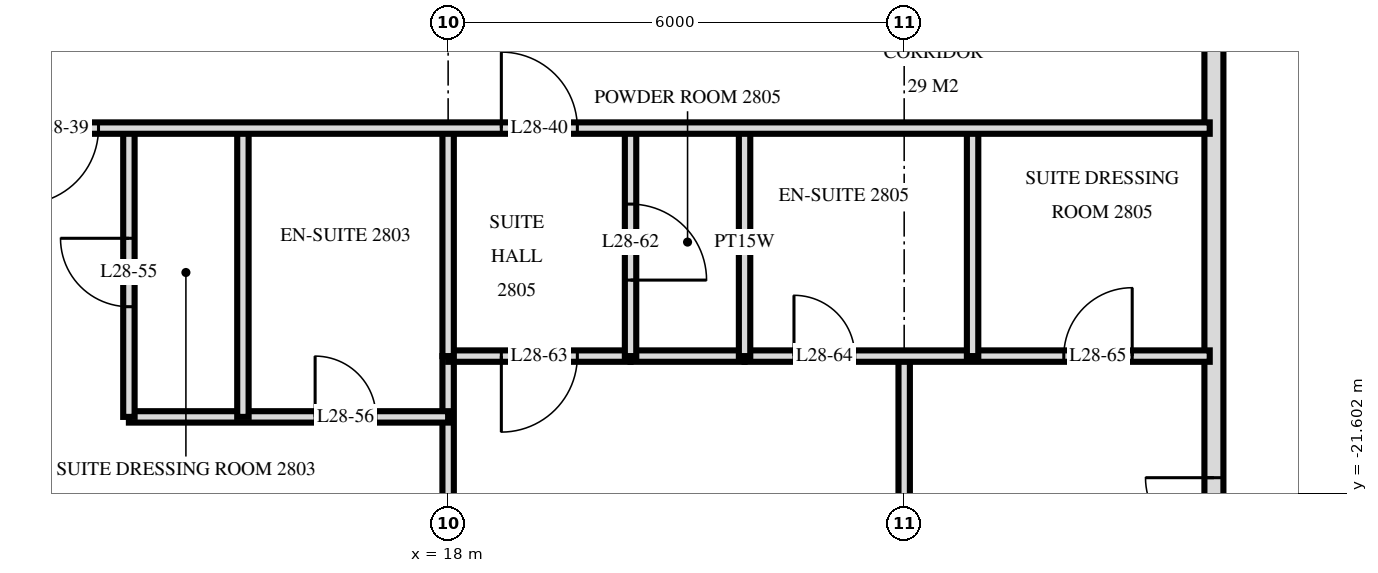
"""IFC4 building model, lengths in metres.
Left out: names, types, materials, properties, quantities, classifications, styles, units other than length and angle.
Written with IfcOpenShell. Run it as: python <this file> out.ifc"""

import sys

from ifc_helpers import new_model, si_unit, direction, frame, frame_2d, origin, place, context, subcontext, project, spatial, rectangle, extrude, element, fill, save


model = new_model("IFC4")
c1 = context("Model", 3, precision=1e-05, world=origin(), true_north=direction((0.0, 1.0)))
c2 = subcontext(c1, "Body", "Model", "MODEL_VIEW")
j1 = project(units=[si_unit("LENGTHUNIT", "METRE"), si_unit("PLANEANGLEUNIT", "RADIAN")], contexts=[c1])
p1 = place(None, origin())
s1 = spatial("IfcSite", under=j1, at=p1, CompositionType="ELEMENT")
p2 = place(p1, origin())
s2 = spatial("IfcBuilding", under=s1, at=p2, CompositionType="ELEMENT")
p3 = place(p2, frame((0.0, 0.0, 112.8)))
s3 = spatial("IfcBuildingStorey", under=s2, at=p3, CompositionType="ELEMENT", Elevation=112.8)
p4 = place(p3, frame((28.075, -29.275, 0.0), z_axis=(0.0, 0.0, 1.0), x_axis=(0.0, 1.0, 0.0)))
e1 = element("IfcWall", 1, at=p4, inside=s3, PredefinedType="SOLIDWALL", context=c2, shape_type="SweptSolid", body=[
    extrude(rectangle(XDim=25.951, YDim=0.25, at=frame_2d((12.975, 0.0))), origin(), (0.0, 0.0, 1.0), 3.32),
])
p5 = place(p4, frame((0.575, 0.0, 0.0)))
e2 = element("IfcOpeningElement", 2, at=p5, cuts=e1, PredefinedType="OPENING", context=c2, shape_type="SweptSolid", body=[
    extrude(rectangle(XDim=1.8, YDim=2.4, at=frame_2d((0.9, 1.2))), frame((0.0, 0.135, 0.0), z_axis=(0.0, -1.0, 0.0), x_axis=(1.0, 0.0, 0.0)), (0.0, 0.0, 1.0), 0.27),
])
p6 = place(p4, frame((3.325, 0.0, 0.3)))
e3 = element("IfcOpeningElement", 3, at=p6, cuts=e1, PredefinedType="OPENING", context=c2, shape_type="SweptSolid", body=[
    extrude(rectangle(XDim=1.8, YDim=2.1, at=frame_2d((0.9, 1.05))), frame((0.0, 0.135, 0.0), z_axis=(0.0, -1.0, 0.0), x_axis=(1.0, 0.0, 0.0)), (0.0, 0.0, 1.0), 0.27),
])
p7 = place(p4, frame((6.075, 0.0, 0.0)))
e4 = element("IfcOpeningElement", 4, at=p7, cuts=e1, PredefinedType="OPENING", context=c2, shape_type="SweptSolid", body=[
    extrude(rectangle(XDim=1.8, YDim=2.4, at=frame_2d((0.9, 1.2))), frame((0.0, 0.135, 0.0), z_axis=(0.0, -1.0, 0.0), x_axis=(1.0, 0.0, 0.0)), (0.0, 0.0, 1.0), 0.27),
])
p8 = place(p4, frame((17.125, 0.0, 0.0)))
e5 = element("IfcOpeningElement", 5, at=p8, cuts=e1, PredefinedType="OPENING", context=c2, shape_type="SweptSolid", body=[
    extrude(rectangle(XDim=1.8, YDim=2.4, at=frame_2d((0.9, 1.2))), frame((0.0, 0.135, 0.0), z_axis=(0.0, -1.0, 0.0), x_axis=(1.0, 0.0, 0.0)), (0.0, 0.0, 1.0), 0.27),
])
p9 = place(p3, frame((24.9, -19.8, 0.0), z_axis=(0.0, 0.0, 1.0), x_axis=(0.0, 1.0, 0.0)))
e6 = element("IfcWall", 6, at=p9, inside=s3, PredefinedType="PARTITIONING", context=c2, shape_type="SweptSolid", body=[
    extrude(rectangle(XDim=3.0, YDim=0.15, at=frame_2d((1.5, 0.0))), origin(), (0.0, 0.0, 1.0), 3.32),
])
p10 = place(p3, frame((24.0, -33.557, 0.0), z_axis=(0.0, 0.0, 1.0), x_axis=(0.0, 1.0, 0.0)))
e7 = element("IfcWall", 7, at=p10, inside=s3, PredefinedType="PARTITIONING", context=c2, shape_type="SweptSolid", body=[
    extrude(rectangle(XDim=13.757, YDim=0.15, at=frame_2d((6.878, 0.0))), origin(), (0.0, 0.0, 1.0), 3.32),
])
p11 = place(p10, frame((6.337, 0.0, 0.0)))
e8 = element("IfcOpeningElement", 8, at=p11, cuts=e7, PredefinedType="OPENING", context=c2, shape_type="SweptSolid", body=[
    extrude(rectangle(XDim=0.9, YDim=2.1, at=frame_2d((0.45, 1.05))), frame((0.0, 0.085, 0.0), z_axis=(0.0, -1.0, 0.0), x_axis=(1.0, 0.0, 0.0)), (0.0, 0.0, 1.0), 0.17),
])
p12 = place(p3, frame((21.9, -19.8, 0.0), z_axis=(0.0, 0.0, 1.0), x_axis=(0.0, 1.0, 0.0)))
e9 = element("IfcWall", 9, at=p12, inside=s3, PredefinedType="PLUMBINGWALL", context=c2, shape_type="SweptSolid", body=[
    extrude(rectangle(XDim=3.0, YDim=0.15, at=frame_2d((1.5, 0.0))), origin(), (0.0, 0.0, 1.0), 3.32),
])
p13 = place(p3, frame((20.4, -19.8, 0.0), z_axis=(0.0, 0.0, 1.0), x_axis=(0.0, 1.0, 0.0)))
e10 = element("IfcWall", 10, at=p13, inside=s3, PredefinedType="PARTITIONING", context=c2, shape_type="SweptSolid", body=[
    extrude(rectangle(XDim=3.0, YDim=0.15, at=frame_2d((1.5, 0.0))), origin(), (0.0, 0.0, 1.0), 3.32),
])
p14 = place(p13, frame((1.0, 0.0, 0.0)))
e11 = element("IfcOpeningElement", 11, at=p14, cuts=e10, PredefinedType="OPENING", context=c2, shape_type="SweptSolid", body=[
    extrude(rectangle(XDim=1.0, YDim=2.1, at=frame_2d((0.5, 1.05))), frame((0.0, 0.085, 0.0), z_axis=(0.0, -1.0, 0.0), x_axis=(1.0, 0.0, 0.0)), (0.0, 0.0, 1.0), 0.17),
])
p15 = place(p3, frame((18.0, -19.8, 0.0), z_axis=(0.0, 0.0, 1.0), x_axis=(0.0, 1.0, 0.0)))
e12 = element("IfcWall", 12, at=p15, inside=s3, PredefinedType="PARTITIONING", context=c2, shape_type="SweptSolid", body=[
    extrude(rectangle(XDim=3.0, YDim=0.15, at=frame_2d((1.5, 0.0))), origin(), (0.0, 0.0, 1.0), 3.32),
])
p16 = place(p3, frame((18.0, -33.62, 0.0), z_axis=(0.0, 0.0, 1.0), x_axis=(0.0, 1.0, 0.0)))
e13 = element("IfcWall", 13, at=p16, inside=s3, PredefinedType="PARTITIONING", context=c2, shape_type="SweptSolid", body=[
    extrude(rectangle(XDim=13.82, YDim=0.15, at=frame_2d((6.91, 0.0))), origin(), (0.0, 0.0, 1.0), 3.32),
])
p17 = place(p3, frame((15.3, -20.6, 0.0), z_axis=(0.0, 0.0, 1.0), x_axis=(0.0, 1.0, 0.0)))
e14 = element("IfcWall", 14, at=p17, inside=s3, PredefinedType="PARTITIONING", context=c2, shape_type="SweptSolid", body=[
    extrude(rectangle(XDim=3.8, YDim=0.15, at=frame_2d((1.9, 0.0))), origin(), (0.0, 0.0, 1.0), 3.32),
])
p18 = place(p3, frame((13.8, -20.6, 0.0), z_axis=(0.0, 0.0, 1.0), x_axis=(0.0, 1.0, 0.0)))
e15 = element("IfcWall", 15, at=p18, inside=s3, PredefinedType="PARTITIONING", context=c2, shape_type="SweptSolid", body=[
    extrude(rectangle(XDim=3.8, YDim=0.15, at=frame_2d((1.9, 0.0))), origin(), (0.0, 0.0, 1.0), 3.32),
])
p19 = place(p18, frame((1.45, 0.0, 0.0)))
e16 = element("IfcOpeningElement", 16, at=p19, cuts=e15, PredefinedType="OPENING", context=c2, shape_type="SweptSolid", body=[
    extrude(rectangle(XDim=0.9, YDim=2.1, at=frame_2d((0.45, 1.05))), frame((0.0, 0.085, 0.0), z_axis=(0.0, -1.0, 0.0), x_axis=(1.0, 0.0, 0.0)), (0.0, 0.0, 1.0), 0.17),
])
p20 = place(p3, frame((13.8, -20.6, 0.0), z_axis=(0.0, 0.0, 1.0), x_axis=(1.0, 0.0, 0.0)))
e17 = element("IfcWall", 17, at=p20, inside=s3, PredefinedType="PARTITIONING", context=c2, shape_type="SweptSolid", body=[
    extrude(rectangle(XDim=4.2, YDim=0.15, at=frame_2d((2.1, 0.0))), origin(), (0.0, 0.0, 1.0), 3.32),
])
p21 = place(p20, frame((2.45, 0.0, 0.0)))
e18 = element("IfcOpeningElement", 18, at=p21, cuts=e17, PredefinedType="OPENING", context=c2, shape_type="SweptSolid", body=[
    extrude(rectangle(XDim=0.8, YDim=2.1, at=frame_2d((0.4, 1.05))), frame((0.0, 0.085, 0.0), z_axis=(0.0, -1.0, 0.0), x_axis=(1.0, 0.0, 0.0)), (0.0, 0.0, 1.0), 0.17),
])
p22 = place(p3, frame((18.0, -19.8, 0.0), z_axis=(0.0, 0.0, 1.0), x_axis=(1.0, 0.0, 0.0)))
e19 = element("IfcWall", 19, at=p22, inside=s3, PredefinedType="PARTITIONING", context=c2, shape_type="SweptSolid", body=[
    extrude(rectangle(XDim=2.4, YDim=0.15, at=frame_2d((1.2, 0.0))), origin(), (0.0, 0.0, 1.0), 3.32),
])
p23 = place(p22, frame((0.7, 0.0, 0.0)))
e20 = element("IfcOpeningElement", 20, at=p23, cuts=e19, PredefinedType="OPENING", context=c2, shape_type="SweptSolid", body=[
    extrude(rectangle(XDim=1.0, YDim=2.1, at=frame_2d((0.5, 1.05))), frame((0.0, 0.085, 0.0), z_axis=(0.0, -1.0, 0.0), x_axis=(1.0, 0.0, 0.0)), (0.0, 0.0, 1.0), 0.17),
])
p24 = place(p3, frame((21.9, -19.8, 0.0), z_axis=(0.0, 0.0, 1.0), x_axis=(1.0, 0.0, 0.0)))
e21 = element("IfcWall", 21, at=p24, inside=s3, PredefinedType="PARTITIONING", context=c2, shape_type="SweptSolid", body=[
    extrude(rectangle(XDim=6.12, YDim=0.15, at=frame_2d((3.06, 0.0))), origin(), (0.0, 0.0, 1.0), 3.32),
])
p25 = place(p24, frame((0.65, 0.0, 0.0)))
e22 = element("IfcOpeningElement", 22, at=p25, cuts=e21, PredefinedType="OPENING", context=c2, shape_type="SweptSolid", body=[
    extrude(rectangle(XDim=0.8, YDim=2.1, at=frame_2d((0.4, 1.05))), frame((0.0, 0.085, 0.0), z_axis=(0.0, -1.0, 0.0), x_axis=(1.0, 0.0, 0.0)), (0.0, 0.0, 1.0), 0.17),
])
p26 = place(p24, frame((4.2, 0.0, 0.0)))
e23 = element("IfcOpeningElement", 23, at=p26, cuts=e21, PredefinedType="OPENING", context=c2, shape_type="SweptSolid", body=[
    extrude(rectangle(XDim=0.9, YDim=2.1, at=frame_2d((0.45, 1.05))), frame((0.0, 0.085, 0.0), z_axis=(0.0, -1.0, 0.0), x_axis=(1.0, 0.0, 0.0)), (0.0, 0.0, 1.0), 0.17),
])
p27 = place(p3, frame((20.4, -19.8, 0.0), z_axis=(0.0, 0.0, 1.0), x_axis=(1.0, 0.0, 0.0)))
e24 = element("IfcWall", 24, at=p27, inside=s3, PredefinedType="PLUMBINGWALL", context=c2, shape_type="SweptSolid", body=[
    extrude(rectangle(XDim=1.5, YDim=0.15, at=frame_2d((0.75, 0.0))), origin(), (0.0, 0.0, 1.0), 3.32),
])
p28 = place(p3, frame((-28.02, -16.8, 0.0), z_axis=(0.0, 0.0, 1.0), x_axis=(1.0, 0.0, 0.0)))
e25 = element("IfcWall", 25, at=p28, inside=s3, PredefinedType="PARTITIONING", context=c2, shape_type="SweptSolid", body=[
    extrude(rectangle(XDim=56.04, YDim=0.15, at=frame_2d((28.02, 0.0))), origin(), (0.0, 0.0, 1.0), 3.32),
])
p29 = place(p28, frame((13.17, 0.0, 0.0)))
e26 = element("IfcOpeningElement", 26, at=p29, cuts=e25, PredefinedType="OPENING", context=c2, shape_type="SweptSolid", body=[
    extrude(rectangle(XDim=1.0, YDim=2.1, at=frame_2d((0.5, 1.05))), frame((0.0, 0.085, 0.0), z_axis=(0.0, -1.0, 0.0), x_axis=(1.0, 0.0, 0.0)), (0.0, 0.0, 1.0), 0.17),
])
p30 = place(p28, frame((11.87, 0.0, 0.0)))
e27 = element("IfcOpeningElement", 27, at=p30, cuts=e25, PredefinedType="OPENING", context=c2, shape_type="SweptSolid", body=[
    extrude(rectangle(XDim=1.0, YDim=2.1, at=frame_2d((0.5, 1.05))), frame((0.0, 0.085, 0.0), z_axis=(0.0, -1.0, 0.0), x_axis=(1.0, 0.0, 0.0)), (0.0, 0.0, 1.0), 0.17),
])
p31 = place(p28, frame((8.32, 0.0, 0.0)))
e28 = element("IfcOpeningElement", 28, at=p31, cuts=e25, PredefinedType="OPENING", context=c2, shape_type="SweptSolid", body=[
    extrude(rectangle(XDim=1.0, YDim=2.1, at=frame_2d((0.5, 1.05))), frame((0.0, 0.085, 0.0), z_axis=(0.0, -1.0, 0.0), x_axis=(1.0, 0.0, 0.0)), (0.0, 0.0, 1.0), 0.17),
])
p32 = place(p28, frame((40.42, 0.0, 0.0)))
e29 = element("IfcOpeningElement", 29, at=p32, cuts=e25, PredefinedType="OPENING", context=c2, shape_type="SweptSolid", body=[
    extrude(rectangle(XDim=1.0, YDim=2.1, at=frame_2d((0.5, 1.05))), frame((0.0, 0.085, 0.0), z_axis=(0.0, -1.0, 0.0), x_axis=(1.0, 0.0, 0.0)), (0.0, 0.0, 1.0), 0.17),
])
p33 = place(p28, frame((46.72, 0.0, 0.0)))
e30 = element("IfcOpeningElement", 30, at=p33, cuts=e25, PredefinedType="OPENING", context=c2, shape_type="SweptSolid", body=[
    extrude(rectangle(XDim=1.0, YDim=2.1, at=frame_2d((0.5, 1.05))), frame((0.0, 0.085, 0.0), z_axis=(0.0, -1.0, 0.0), x_axis=(1.0, 0.0, 0.0)), (0.0, 0.0, 1.0), 0.17),
])
p34 = place(p28, frame((21.52, 0.0, 0.0)))
e31 = element("IfcOpeningElement", 31, at=p34, cuts=e25, PredefinedType="OPENING", context=c2, shape_type="SweptSolid", body=[
    extrude(rectangle(XDim=1.0, YDim=2.1, at=frame_2d((0.5, 1.05))), frame((0.0, 0.085, 0.0), z_axis=(0.0, -1.0, 0.0), x_axis=(1.0, 0.0, 0.0)), (0.0, 0.0, 1.0), 0.17),
])
p35 = place(p28, frame((30.52, 0.0, 0.0)))
e32 = element("IfcOpeningElement", 32, at=p35, cuts=e25, PredefinedType="OPENING", context=c2, shape_type="SweptSolid", body=[
    extrude(rectangle(XDim=1.0, YDim=2.1, at=frame_2d((0.5, 1.05))), frame((0.0, 0.085, 0.0), z_axis=(0.0, -1.0, 0.0), x_axis=(1.0, 0.0, 0.0)), (0.0, 0.0, 1.0), 0.17),
])
p36 = place(p28, frame((36.52, 0.0, 0.0)))
e33 = element("IfcOpeningElement", 33, at=p36, cuts=e25, PredefinedType="OPENING", context=c2, shape_type="SweptSolid", body=[
    extrude(rectangle(XDim=1.0, YDim=2.1, at=frame_2d((0.5, 1.05))), frame((0.0, 0.085, 0.0), z_axis=(0.0, -1.0, 0.0), x_axis=(1.0, 0.0, 0.0)), (0.0, 0.0, 1.0), 0.17),
])
p37 = place(p7, origin())
e34 = element("IfcDoor", 34, at=p37, inside=s3, OperationType="DOUBLE_DOOR_SINGLE_SWING", PredefinedType="DOOR", context=c2, shape_type="SweptSolid", body=[
    extrude(rectangle(XDim=1.8, YDim=2.4, at=frame_2d((0.9, 1.2))), frame((0.0, 0.025, 0.0), z_axis=(0.0, -1.0, 0.0), x_axis=(1.0, 0.0, 0.0)), (0.0, 0.0, 1.0), 0.05),
])
fill(e4, e34)
p38 = place(p32, frame((0.5, 0.0, 0.0), z_axis=(0.0, 0.0, 1.0), x_axis=(-1.0, 0.0, 0.0)))
e35 = element("IfcDoor", 35, at=p38, inside=s3, OperationType="SINGLE_SWING_LEFT", PredefinedType="DOOR", context=c2, shape_type="SweptSolid", body=[
    extrude(rectangle(XDim=1.0, YDim=2.1, at=frame_2d((0.0, 1.05))), frame((0.0, -0.025, 0.0), z_axis=(0.0, 1.0, 0.0), x_axis=(-1.0, 0.0, 0.0)), (0.0, 0.0, 1.0), 0.05),
])
fill(e29, e35)
p39 = place(p33, origin())
e36 = element("IfcDoor", 36, at=p39, inside=s3, OperationType="SINGLE_SWING_RIGHT", PredefinedType="DOOR", context=c2, shape_type="SweptSolid", body=[
    extrude(rectangle(XDim=1.0, YDim=2.1, at=frame_2d((0.5, 1.05))), frame((0.0, 0.025, 0.0), z_axis=(0.0, -1.0, 0.0), x_axis=(1.0, 0.0, 0.0)), (0.0, 0.0, 1.0), 0.05),
])
fill(e30, e36)
p40 = place(p19, origin())
e37 = element("IfcDoor", 37, at=p40, inside=s3, OperationType="SINGLE_SWING_LEFT", PredefinedType="DOOR", context=c2, shape_type="SweptSolid", body=[
    extrude(rectangle(XDim=0.9, YDim=2.1, at=frame_2d((0.45, 1.05))), frame((0.0, 0.025, 0.0), z_axis=(0.0, -1.0, 0.0), x_axis=(1.0, 0.0, 0.0)), (0.0, 0.0, 1.0), 0.05),
])
fill(e16, e37)
p41 = place(p21, origin())
e38 = element("IfcDoor", 38, at=p41, inside=s3, OperationType="SINGLE_SWING_RIGHT", PredefinedType="DOOR", context=c2, shape_type="SweptSolid", body=[
    extrude(rectangle(XDim=0.8, YDim=2.1, at=frame_2d((0.4, 1.05))), frame((0.0, 0.025, 0.0), z_axis=(0.0, -1.0, 0.0), x_axis=(1.0, 0.0, 0.0)), (0.0, 0.0, 1.0), 0.05),
])
fill(e18, e38)
p42 = place(p14, frame((0.5, 0.0, 0.0), z_axis=(0.0, 0.0, 1.0), x_axis=(-1.0, 0.0, 0.0)))
e39 = element("IfcDoor", 39, at=p42, inside=s3, OperationType="SINGLE_SWING_LEFT", PredefinedType="DOOR", context=c2, shape_type="SweptSolid", body=[
    extrude(rectangle(XDim=1.0, YDim=2.1, at=frame_2d((0.0, 1.05))), frame((0.0, -0.025, 0.0), z_axis=(0.0, 1.0, 0.0), x_axis=(-1.0, 0.0, 0.0)), (0.0, 0.0, 1.0), 0.05),
])
fill(e11, e39)
p43 = place(p23, frame((0.5, 0.0, 0.0), z_axis=(0.0, 0.0, 1.0), x_axis=(-1.0, 0.0, 0.0)))
e40 = element("IfcDoor", 40, at=p43, inside=s3, OperationType="SINGLE_SWING_LEFT", PredefinedType="DOOR", context=c2, shape_type="SweptSolid", body=[
    extrude(rectangle(XDim=1.0, YDim=2.1, at=frame_2d((0.0, 1.05))), frame((0.0, -0.025, 0.0), z_axis=(0.0, 1.0, 0.0), x_axis=(-1.0, 0.0, 0.0)), (0.0, 0.0, 1.0), 0.05),
])
fill(e20, e40)
p44 = place(p25, origin())
e41 = element("IfcDoor", 41, at=p44, inside=s3, OperationType="SINGLE_SWING_RIGHT", PredefinedType="DOOR", context=c2, shape_type="SweptSolid", body=[
    extrude(rectangle(XDim=0.8, YDim=2.1, at=frame_2d((0.4, 1.05))), frame((0.0, 0.025, 0.0), z_axis=(0.0, -1.0, 0.0), x_axis=(1.0, 0.0, 0.0)), (0.0, 0.0, 1.0), 0.05),
])
fill(e22, e41)
p45 = place(p26, origin())
e42 = element("IfcDoor", 42, at=p45, inside=s3, OperationType="SINGLE_SWING_LEFT", PredefinedType="DOOR", context=c2, shape_type="SweptSolid", body=[
    extrude(rectangle(XDim=0.9, YDim=2.1, at=frame_2d((0.45, 1.05))), frame((0.0, 0.025, 0.0), z_axis=(0.0, -1.0, 0.0), x_axis=(1.0, 0.0, 0.0)), (0.0, 0.0, 1.0), 0.05),
])
fill(e23, e42)
save(model, sys.argv[1])
